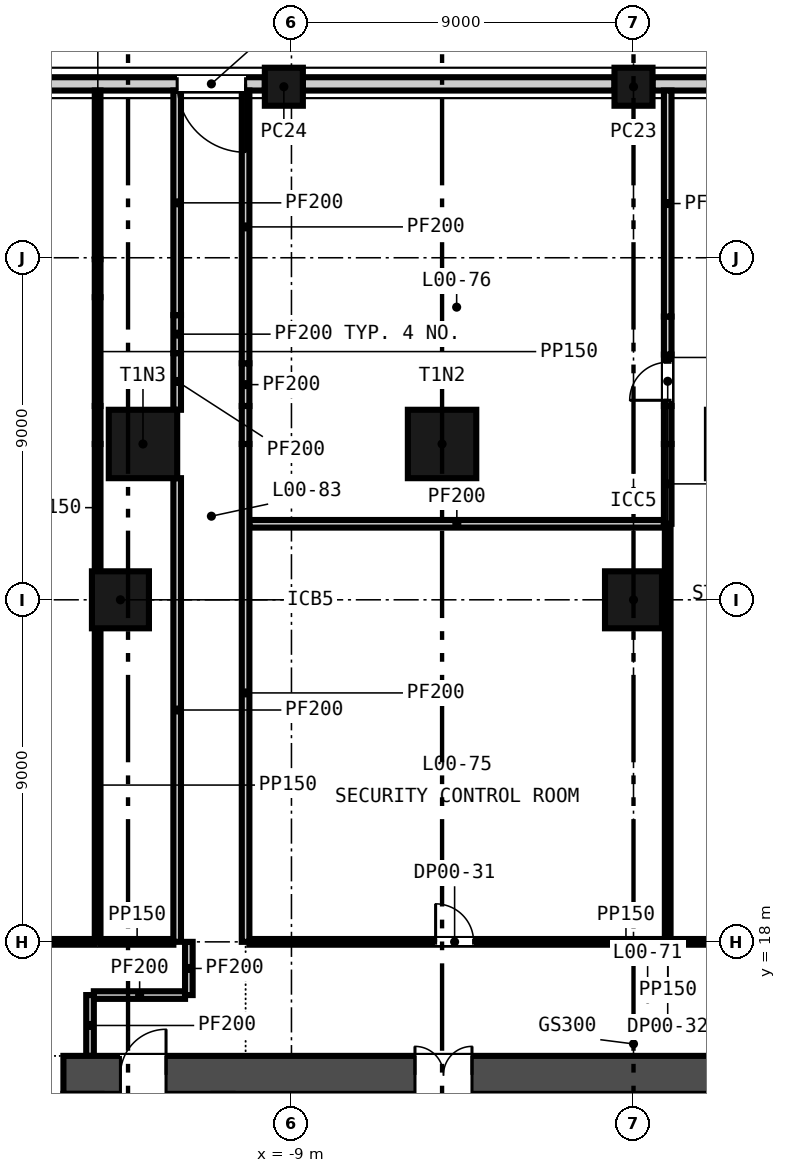
"""IFC4 building model, lengths in metres.
Left out: names, types, materials, properties, quantities, classifications, styles, units other than length and angle.
Written with IfcOpenShell. Run it as: python <this file> out.ifc"""

import sys

from ifc_helpers import new_model, si_unit, direction, frame, frame_2d, origin, origin_2d, place, context, subcontext, project, spatial, rectangle, extrude, element, fill, save


model = new_model("IFC4")
c1 = context("Model", 3, precision=1e-05, world=origin(), true_north=direction((0.0, 1.0)))
c2 = subcontext(c1, "Body", "Model", "MODEL_VIEW")
j1 = project(units=[si_unit("LENGTHUNIT", "METRE"), si_unit("PLANEANGLEUNIT", "RADIAN")], contexts=[c1])
p1 = place(None, origin())
s1 = spatial("IfcSite", under=j1, at=p1, CompositionType="ELEMENT")
p2 = place(p1, origin())
s2 = spatial("IfcBuilding", under=s1, at=p2, CompositionType="ELEMENT")
p3 = place(p2, origin())
s3 = spatial("IfcBuildingStorey", under=s2, at=p3, CompositionType="ELEMENT", Elevation=0.0)
p4 = place(p3, frame((-15.0, 14.5, -2.2), z_axis=(0.0, 0.0, 1.0), x_axis=(1.0, 0.0, 0.0)))
e1 = element("IfcWall", 1, at=p4, inside=s3, PredefinedType="SOLIDWALL", context=c2, shape_type="SweptSolid", body=[
    extrude(rectangle(XDim=30.0, YDim=1.0, at=frame_2d((15.0, 0.0))), origin(), (0.0, 0.0, 1.0), 10.8),
])
p5 = place(p4, frame((9.25, 0.0, 2.2)))
e2 = element("IfcOpeningElement", 2, at=p5, cuts=e1, PredefinedType="OPENING", context=c2, shape_type="SweptSolid", body=[
    extrude(rectangle(XDim=1.5, YDim=2.1, at=frame_2d((0.75, 1.05))), frame((0.0, 0.51, 0.0), z_axis=(0.0, -1.0, 0.0), x_axis=(1.0, 0.0, 0.0)), (0.0, 0.0, 1.0), 1.02),
])
p6 = place(p4, frame((19.4, 0.0, 2.2)))
e3 = element("IfcOpeningElement", 3, at=p6, cuts=e1, PredefinedType="OPENING", context=c2, shape_type="SweptSolid", body=[
    extrude(rectangle(XDim=1.5, YDim=2.1, at=frame_2d((0.75, 1.05))), frame((0.0, 0.51, 0.0), z_axis=(0.0, -1.0, 0.0), x_axis=(1.0, 0.0, 0.0)), (0.0, 0.0, 1.0), 1.02),
])
p7 = place(p4, frame((1.5, 0.0, 2.2)))
e4 = element("IfcOpeningElement", 4, at=p7, cuts=e1, PredefinedType="OPENING", context=c2, shape_type="SweptSolid", body=[
    extrude(rectangle(XDim=1.2, YDim=2.1, at=frame_2d((0.6, 1.05))), frame((0.0, 0.51, 0.0), z_axis=(0.0, -1.0, 0.0), x_axis=(1.0, 0.0, 0.0)), (0.0, 0.0, 1.0), 1.02),
])
p8 = place(p4, frame((27.3, 0.0, 2.2)))
e5 = element("IfcOpeningElement", 5, at=p8, cuts=e1, PredefinedType="OPENING", context=c2, shape_type="SweptSolid", body=[
    extrude(rectangle(XDim=1.2, YDim=2.1, at=frame_2d((0.6, 1.05))), frame((0.0, 0.51, 0.0), z_axis=(0.0, -1.0, 0.0), x_axis=(1.0, 0.0, 0.0)), (0.0, 0.0, 1.0), 1.02),
])
for number, where, z_axis, x_axis in (
    (6, (-5.037, 31.1, -0.3), (0.0, 0.0, 1.0), (-1.0, 0.0, 0.0)),
    (7, (-12.907, 31.1, -0.3), (0.0, 0.0, 1.0), (-1.0, 0.0, 0.0)),
):
    element("IfcColumn", number, at=place(p3, frame(where, z_axis=z_axis, x_axis=x_axis)), inside=s3, PredefinedType="COLUMN", context=c2, shape_type="SweptSolid", body=[
        extrude(rectangle(XDim=1.8, YDim=1.8, at=origin_2d()), origin(), (0.0, 0.0, 1.0), 8.9),
    ])
for number, where, z_axis, x_axis in (
    (8, (-13.5, 27.0, -0.3), (0.0, 0.0, 1.0), (1.0, 0.0, 0.0)),
    (9, (0.0, 27.0, -0.3), (0.0, 0.0, 1.0), (1.0, 0.0, 0.0)),
):
    element("IfcColumn", number, at=place(p3, frame(where, z_axis=z_axis, x_axis=x_axis)), inside=s3, PredefinedType="COLUMN", context=c2, shape_type="SweptSolid", body=[
        extrude(rectangle(XDim=1.5, YDim=1.5, at=origin_2d()), origin(), (0.0, 0.0, 1.0), 8.9),
    ])
for number, where, z_axis, x_axis in (
    (10, (0.0, 40.5, -0.3), (0.0, 0.0, 1.0), (-1.0, 0.0, 0.0)),
    (11, (-9.2, 40.5, -0.3), (0.0, 0.0, 1.0), (-1.0, 0.0, 0.0)),
):
    element("IfcColumn", number, at=place(p3, frame(where, z_axis=z_axis, x_axis=x_axis)), inside=s3, PredefinedType="COLUMN", context=c2, shape_type="SweptSolid", body=[
        extrude(rectangle(XDim=1.0, YDim=1.0, at=origin_2d()), origin(), (0.0, 0.0, 1.0), 8.9),
    ])
p9 = place(p3, frame((8.7, 40.575, -0.3), z_axis=(0.0, 0.0, 1.0), x_axis=(-1.0, 0.0, 0.0)))
e12 = element("IfcWall", 12, at=p9, inside=s3, PredefinedType="SOLIDWALL", context=c2, shape_type="SweptSolid", body=[
    extrude(rectangle(XDim=8.2, YDim=0.35, at=frame_2d((4.1, 0.0))), origin(), (0.0, 0.0, 1.0), 8.0),
])
p10 = place(p9, frame((2.9, 0.0, 0.3)))
e13 = element("IfcOpeningElement", 13, at=p10, cuts=e12, PredefinedType="OPENING", context=c2, shape_type="SweptSolid", body=[
    extrude(rectangle(XDim=2.4, YDim=2.4, at=frame_2d((1.2, 1.2))), frame((0.0, 0.185, 0.0), z_axis=(0.0, -1.0, 0.0), x_axis=(1.0, 0.0, 0.0)), (0.0, 0.0, 1.0), 0.37),
])
p11 = place(p3, frame((-0.5, 40.575, -0.3), z_axis=(0.0, 0.0, 1.0), x_axis=(-1.0, 0.0, 0.0)))
e14 = element("IfcWall", 14, at=p11, inside=s3, PredefinedType="SOLIDWALL", context=c2, shape_type="SweptSolid", body=[
    extrude(rectangle(XDim=8.2, YDim=0.35, at=frame_2d((4.1, 0.0))), origin(), (0.0, 0.0, 1.0), 8.0),
])
p12 = place(p3, frame((-9.7, 40.575, -0.3), z_axis=(0.0, 0.0, 1.0), x_axis=(-1.0, 0.0, 0.0)))
e15 = element("IfcWall", 15, at=p12, inside=s3, PredefinedType="SOLIDWALL", context=c2, shape_type="SweptSolid", body=[
    extrude(rectangle(XDim=8.2, YDim=0.35, at=frame_2d((4.1, 0.0))), origin(), (0.0, 0.0, 1.0), 8.0),
])
p13 = place(p12, frame((0.507, 0.0, 0.3)))
e16 = element("IfcOpeningElement", 16, at=p13, cuts=e15, PredefinedType="OPENING", context=c2, shape_type="SweptSolid", body=[
    extrude(rectangle(XDim=1.8, YDim=2.4, at=frame_2d((0.9, 1.2))), frame((0.0, 0.185, 0.0), z_axis=(0.0, -1.0, 0.0), x_axis=(1.0, 0.0, 0.0)), (0.0, 0.0, 1.0), 0.37),
])
for number, where, z_axis, x_axis in (
    (17, (-8.275, 11.3, 0.0), (0.0, 0.0, 1.0), (0.0, 1.0, 0.0)),
    (18, (-5.875, 11.3, 0.0), (0.0, 0.0, 1.0), (0.0, 1.0, 0.0)),
    (19, (-4.125, 11.3, 0.0), (0.0, 0.0, 1.0), (0.0, 1.0, 0.0)),
    (20, (-1.325, 11.3, 0.0), (0.0, 0.0, 1.0), (0.0, 1.0, 0.0)),
    (21, (1.475, 11.3, 0.0), (0.0, 0.0, 1.0), (0.0, 1.0, 0.0)),
):
    element("IfcWall", number, at=place(p3, frame(where, z_axis=z_axis, x_axis=x_axis)), inside=s3, PredefinedType="PARTITIONING", context=c2, shape_type="SweptSolid", body=[
        extrude(rectangle(XDim=2.7, YDim=0.25, at=frame_2d((1.35, 0.0))), origin(), (0.0, 0.0, 1.0), 8.6),
    ])
p14 = place(p3, frame((-14.2, 16.6, 0.0), z_axis=(0.0, 0.0, 1.0), x_axis=(1.0, 0.0, 0.0)))
e22 = element("IfcWall", 22, at=p14, inside=s3, PredefinedType="PARTITIONING", context=c2, shape_type="SweptSolid", body=[
    extrude(rectangle(XDim=2.4, YDim=0.2, at=frame_2d((1.2, 0.0))), origin(), (0.0, 0.0, 1.0), 8.6),
])
p15 = place(p3, frame((-26.142, 18.0, 0.0), z_axis=(0.0, 0.0, 1.0), x_axis=(1.0, 0.0, 0.0)))
e23 = element("IfcWall", 23, at=p15, inside=s3, PredefinedType="PARTITIONING", context=c2, shape_type="SweptSolid", body=[
    extrude(rectangle(XDim=11.967, YDim=0.15, at=frame_2d((5.984, 0.0))), origin(), (0.0, 0.0, 1.0), 8.6),
])
p16 = place(p3, frame((-14.025, 18.0, 0.0), z_axis=(0.0, 0.0, 1.0), x_axis=(1.0, 0.0, 0.0)))
e24 = element("IfcWall", 24, at=p16, inside=s3, PredefinedType="PARTITIONING", context=c2, shape_type="SweptSolid", body=[
    extrude(rectangle(XDim=1.918, YDim=0.15, at=frame_2d((0.959, 0.0))), origin(), (0.0, 0.0, 1.0), 8.6),
])
p17 = place(p3, frame((-10.107, 18.0, 0.0), z_axis=(0.0, 0.0, 1.0), x_axis=(1.0, 0.0, 0.0)))
e25 = element("IfcWall", 25, at=p17, inside=s3, PredefinedType="PARTITIONING", context=c2, shape_type="SweptSolid", body=[
    extrude(rectangle(XDim=20.957, YDim=0.15, at=frame_2d((10.479, 0.0))), origin(), (0.0, 0.0, 1.0), 8.6),
])
p18 = place(p17, frame((13.907, 0.0, 0.0)))
e26 = element("IfcOpeningElement", 26, at=p18, cuts=e25, PredefinedType="OPENING", context=c2, shape_type="SweptSolid", body=[
    extrude(rectangle(XDim=1.8, YDim=2.4, at=frame_2d((0.9, 1.2))), frame((0.0, 0.085, 0.0), z_axis=(0.0, -1.0, 0.0), x_axis=(1.0, 0.0, 0.0)), (0.0, 0.0, 1.0), 0.17),
])
p19 = place(p17, frame((4.9, 0.0, 0.0)))
e27 = element("IfcOpeningElement", 27, at=p19, cuts=e25, PredefinedType="OPENING", context=c2, shape_type="SweptSolid", body=[
    extrude(rectangle(XDim=1.0, YDim=2.1, at=frame_2d((0.5, 1.05))), frame((0.0, 0.085, 0.0), z_axis=(0.0, -1.0, 0.0), x_axis=(1.0, 0.0, 0.0)), (0.0, 0.0, 1.0), 0.17),
])
p20 = place(p3, frame((-10.107, 29.0, 0.0), z_axis=(0.0, 0.0, 1.0), x_axis=(1.0, 0.0, 0.0)))
e28 = element("IfcWall", 28, at=p20, inside=s3, PredefinedType="PARTITIONING", context=c2, shape_type="SweptSolid", body=[
    extrude(rectangle(XDim=10.907, YDim=0.2, at=frame_2d((5.454, 0.0))), origin(), (0.0, 0.0, 1.0), 8.6),
])
p21 = place(p3, frame((-14.3, 15.0, 0.0), z_axis=(0.0, 0.0, 1.0), x_axis=(0.0, 1.0, 0.0)))
e29 = element("IfcWall", 29, at=p21, inside=s3, PredefinedType="PARTITIONING", context=c2, shape_type="SweptSolid", body=[
    extrude(rectangle(XDim=1.6, YDim=0.2, at=frame_2d((0.8, 0.0))), origin(), (0.0, 0.0, 1.0), 8.6),
])
p22 = place(p3, frame((-14.1, 18.001, 0.0), z_axis=(0.0, 0.0, 1.0), x_axis=(0.0, 1.0, 0.0)))
e30 = element("IfcWall", 30, at=p22, inside=s3, PredefinedType="PARTITIONING", context=c2, shape_type="SweptSolid", body=[
    extrude(rectangle(XDim=8.249, YDim=0.15, at=frame_2d((4.125, 0.0))), origin(), (0.0, 0.0, 1.0), 8.6),
])
p23 = place(p3, frame((-14.1, 27.75, 0.0), z_axis=(0.0, 0.0, 1.0), x_axis=(0.0, 1.0, 0.0)))
e31 = element("IfcWall", 31, at=p23, inside=s3, PredefinedType="PARTITIONING", context=c2, shape_type="SweptSolid", body=[
    extrude(rectangle(XDim=3.35, YDim=0.15, at=frame_2d((1.675, 0.0))), origin(), (0.0, 0.0, 1.0), 8.6),
])
p24 = place(p3, frame((-14.1, 31.1, 0.0), z_axis=(0.0, 0.0, 1.0), x_axis=(0.0, 1.0, 0.0)))
e32 = element("IfcWall", 32, at=p24, inside=s3, PredefinedType="PARTITIONING", context=c2, shape_type="SweptSolid", body=[
    extrude(rectangle(XDim=1.0, YDim=0.15, at=frame_2d((0.5, 0.0))), origin(), (0.0, 0.0, 1.0), 7.6),
])
p25 = place(p3, frame((-14.1, 32.1, 0.0), z_axis=(0.0, 0.0, 1.0), x_axis=(0.0, 1.0, 0.0)))
e33 = element("IfcWall", 33, at=p25, inside=s3, PredefinedType="PARTITIONING", context=c2, shape_type="SweptSolid", body=[
    extrude(rectangle(XDim=2.862, YDim=0.15, at=frame_2d((1.431, 0.0))), origin(), (0.0, 0.0, 1.0), 8.6),
])
p26 = place(p3, frame((-14.1, 34.962, 0.0), z_axis=(0.0, 0.0, 1.0), x_axis=(0.0, 1.0, 0.0)))
e34 = element("IfcWall", 34, at=p26, inside=s3, PredefinedType="PARTITIONING", context=c2, shape_type="SweptSolid", body=[
    extrude(rectangle(XDim=1.0, YDim=0.15, at=frame_2d((0.5, 0.0))), origin(), (0.0, 0.0, 1.0), 7.841),
])
p27 = place(p3, frame((-14.1, 35.962, 0.0), z_axis=(0.0, 0.0, 1.0), x_axis=(0.0, 1.0, 0.0)))
e35 = element("IfcWall", 35, at=p27, inside=s3, PredefinedType="PARTITIONING", context=c2, shape_type="SweptSolid", body=[
    extrude(rectangle(XDim=4.438, YDim=0.15, at=frame_2d((2.219, 0.0))), origin(), (0.0, 0.0, 1.0), 8.6),
])
p28 = place(p3, frame((-12.007, 18.001, 0.0), z_axis=(0.0, 0.0, 1.0), x_axis=(0.0, 1.0, 0.0)))
e36 = element("IfcWall", 36, at=p28, inside=s3, PredefinedType="PARTITIONING", context=c2, shape_type="SweptSolid", body=[
    extrude(rectangle(XDim=12.199, YDim=0.2, at=frame_2d((6.1, 0.0))), origin(), (0.0, 0.0, 1.0), 8.6),
])
p29 = place(p3, frame((-12.007, 32.0, 0.0), z_axis=(0.0, 0.0, 1.0), x_axis=(0.0, 1.0, 0.0)))
e37 = element("IfcWall", 37, at=p29, inside=s3, PredefinedType="PARTITIONING", context=c2, shape_type="SweptSolid", body=[
    extrude(rectangle(XDim=1.49, YDim=0.2, at=frame_2d((0.745, 0.0))), origin(), (0.0, 0.0, 1.0), 8.6),
])
p30 = place(p3, frame((-12.007, 33.49, 0.0), z_axis=(0.0, 0.0, 1.0), x_axis=(0.0, 1.0, 0.0)))
e38 = element("IfcWall", 38, at=p30, inside=s3, PredefinedType="PARTITIONING", context=c2, shape_type="SweptSolid", body=[
    extrude(rectangle(XDim=1.0, YDim=0.2, at=frame_2d((0.5, 0.0))), origin(), (0.0, 0.0, 1.0), 7.841),
])
p31 = place(p3, frame((-12.007, 34.49, 0.0), z_axis=(0.0, 0.0, 1.0), x_axis=(0.0, 1.0, 0.0)))
e39 = element("IfcWall", 39, at=p31, inside=s3, PredefinedType="PARTITIONING", context=c2, shape_type="SweptSolid", body=[
    extrude(rectangle(XDim=5.91, YDim=0.2, at=frame_2d((2.955, 0.0))), origin(), (0.0, 0.0, 1.0), 8.6),
])
p32 = place(p3, frame((-11.7, 16.6, 0.0), z_axis=(0.0, 0.0, 1.0), x_axis=(0.0, 1.0, 0.0)))
e40 = element("IfcWall", 40, at=p32, inside=s3, PredefinedType="PARTITIONING", context=c2, shape_type="SweptSolid", body=[
    extrude(rectangle(XDim=1.4, YDim=0.2, at=frame_2d((0.7, 0.0))), origin(), (0.0, 0.0, 1.0), 8.6),
])
p33 = place(p3, frame((-10.207, 18.0, 0.0), z_axis=(0.0, 0.0, 1.0), x_axis=(0.0, 1.0, 0.0)))
e41 = element("IfcWall", 41, at=p33, inside=s3, PredefinedType="PARTITIONING", context=c2, shape_type="SweptSolid", body=[
    extrude(rectangle(XDim=13.1, YDim=0.2, at=frame_2d((6.55, 0.0))), origin(), (0.0, 0.0, 1.0), 8.6),
])
p34 = place(p3, frame((-10.207, 31.1, 0.0), z_axis=(0.0, 0.0, 1.0), x_axis=(0.0, 1.0, 0.0)))
e42 = element("IfcWall", 42, at=p34, inside=s3, PredefinedType="PARTITIONING", context=c2, shape_type="SweptSolid", body=[
    extrude(rectangle(XDim=1.0, YDim=0.2, at=frame_2d((0.5, 0.0))), origin(), (0.0, 0.0, 1.0), 7.6),
])
p35 = place(p3, frame((-10.207, 32.1, 0.0), z_axis=(0.0, 0.0, 1.0), x_axis=(0.0, 1.0, 0.0)))
e43 = element("IfcWall", 43, at=p35, inside=s3, PredefinedType="PARTITIONING", context=c2, shape_type="SweptSolid", body=[
    extrude(rectangle(XDim=1.124, YDim=0.2, at=frame_2d((0.562, 0.0))), origin(), (0.0, 0.0, 1.0), 7.841),
])
p36 = place(p3, frame((-10.207, 33.224, 0.0), z_axis=(0.0, 0.0, 1.0), x_axis=(0.0, 1.0, 0.0)))
e44 = element("IfcWall", 44, at=p36, inside=s3, PredefinedType="PARTITIONING", context=c2, shape_type="SweptSolid", body=[
    extrude(rectangle(XDim=7.176, YDim=0.2, at=frame_2d((3.588, 0.0))), origin(), (0.0, 0.0, 1.0), 8.6),
])
p37 = place(p3, frame((0.9, 18.075, 0.0), z_axis=(0.0, 0.0, 1.0), x_axis=(0.0, 1.0, 0.0)))
e45 = element("IfcWall", 45, at=p37, inside=s3, PredefinedType="PARTITIONING", context=c2, shape_type="SweptSolid", body=[
    extrude(rectangle(XDim=10.925, YDim=0.15, at=frame_2d((5.462, 0.0))), origin(), (0.0, 0.0, 1.0), 8.6),
])
p38 = place(p3, frame((0.9, 29.0, 0.0), z_axis=(0.0, 0.0, 1.0), x_axis=(0.0, 1.0, 0.0)))
e46 = element("IfcWall", 46, at=p38, inside=s3, PredefinedType="PARTITIONING", context=c2, shape_type="SweptSolid", body=[
    extrude(rectangle(XDim=2.1, YDim=0.2, at=frame_2d((1.05, 0.0))), origin(), (0.0, 0.0, 1.0), 8.6),
])
p39 = place(p3, frame((0.9, 31.1, 0.0), z_axis=(0.0, 0.0, 1.0), x_axis=(0.0, 1.0, 0.0)))
e47 = element("IfcWall", 47, at=p39, inside=s3, PredefinedType="PARTITIONING", context=c2, shape_type="SweptSolid", body=[
    extrude(rectangle(XDim=1.0, YDim=0.2, at=frame_2d((0.5, 0.0))), origin(), (0.0, 0.0, 1.0), 7.6),
])
p40 = place(p3, frame((0.9, 32.1, 0.0), z_axis=(0.0, 0.0, 1.0), x_axis=(0.0, 1.0, 0.0)))
e48 = element("IfcWall", 48, at=p40, inside=s3, PredefinedType="PARTITIONING", context=c2, shape_type="SweptSolid", body=[
    extrude(rectangle(XDim=1.353, YDim=0.2, at=frame_2d((0.677, 0.0))), origin(), (0.0, 0.0, 1.0), 8.6),
])
p41 = place(p40, frame((0.15, 0.0, 0.0)))
e49 = element("IfcOpeningElement", 49, at=p41, cuts=e48, PredefinedType="OPENING", context=c2, shape_type="SweptSolid", body=[
    extrude(rectangle(XDim=1.0, YDim=2.1, at=frame_2d((0.5, 1.05))), frame((0.0, 0.11, 0.0), z_axis=(0.0, -1.0, 0.0), x_axis=(1.0, 0.0, 0.0)), (0.0, 0.0, 1.0), 0.22),
])
p42 = place(p3, frame((0.9, 33.453, 0.0), z_axis=(0.0, 0.0, 1.0), x_axis=(0.0, 1.0, 0.0)))
e50 = element("IfcWall", 50, at=p42, inside=s3, PredefinedType="PARTITIONING", context=c2, shape_type="SweptSolid", body=[
    extrude(rectangle(XDim=1.0, YDim=0.2, at=frame_2d((0.5, 0.0))), origin(), (0.0, 0.0, 1.0), 7.921),
])
p43 = place(p3, frame((0.9, 34.453, 0.0), z_axis=(0.0, 0.0, 1.0), x_axis=(0.0, 1.0, 0.0)))
e51 = element("IfcWall", 51, at=p43, inside=s3, PredefinedType="PARTITIONING", context=c2, shape_type="SweptSolid", body=[
    extrude(rectangle(XDim=5.947, YDim=0.2, at=frame_2d((2.973, 0.0))), origin(), (0.0, 0.0, 1.0), 8.6),
])
p44 = place(p13, frame((1.8, 0.0, 0.0), z_axis=(0.0, 0.0, 1.0), x_axis=(-1.0, 0.0, 0.0)))
e52 = element("IfcDoor", 52, at=p44, inside=s3, OperationType="SINGLE_SWING_LEFT", PredefinedType="DOOR", context=c2, shape_type="SweptSolid", body=[
    extrude(rectangle(XDim=1.8, YDim=2.4, at=frame_2d((0.9, 1.2))), frame((0.0, 0.025, 0.0), z_axis=(0.0, -1.0, 0.0), x_axis=(1.0, 0.0, 0.0)), (0.0, 0.0, 1.0), 0.05),
])
fill(e16, e52)
p45 = place(p5, origin())
e53 = element("IfcDoor", 53, at=p45, inside=s3, OperationType="DOUBLE_DOOR_SINGLE_SWING", PredefinedType="DOOR", context=c2, shape_type="SweptSolid", body=[
    extrude(rectangle(XDim=1.5, YDim=2.1, at=frame_2d((0.75, 1.05))), frame((0.0, 0.025, 0.0), z_axis=(0.0, -1.0, 0.0), x_axis=(1.0, 0.0, 0.0)), (0.0, 0.0, 1.0), 0.05),
])
fill(e2, e53)
p46 = place(p7, origin())
e54 = element("IfcDoor", 54, at=p46, inside=s3, OperationType="SINGLE_SWING_RIGHT", PredefinedType="DOOR", context=c2, shape_type="SweptSolid", body=[
    extrude(rectangle(XDim=1.2, YDim=2.1, at=frame_2d((0.6, 1.05))), frame((0.0, 0.025, 0.0), z_axis=(0.0, -1.0, 0.0), x_axis=(1.0, 0.0, 0.0)), (0.0, 0.0, 1.0), 0.05),
])
fill(e4, e54)
p47 = place(p19, origin())
e55 = element("IfcDoor", 55, at=p47, inside=s3, OperationType="SINGLE_SWING_LEFT", PredefinedType="DOOR", context=c2, shape_type="SweptSolid", body=[
    extrude(rectangle(XDim=1.0, YDim=2.1, at=frame_2d((0.5, 1.05))), frame((0.0, 0.025, 0.0), z_axis=(0.0, -1.0, 0.0), x_axis=(1.0, 0.0, 0.0)), (0.0, 0.0, 1.0), 0.05),
])
fill(e27, e55)
p48 = place(p41, origin())
e56 = element("IfcDoor", 56, at=p48, inside=s3, OperationType="SINGLE_SWING_LEFT", PredefinedType="DOOR", context=c2, shape_type="SweptSolid", body=[
    extrude(rectangle(XDim=1.0, YDim=2.1, at=frame_2d((0.5, 1.05))), frame((0.0, 0.025, 0.0), z_axis=(0.0, -1.0, 0.0), x_axis=(1.0, 0.0, 0.0)), (0.0, 0.0, 1.0), 0.05),
])
fill(e49, e56)
save(model, sys.argv[1])
